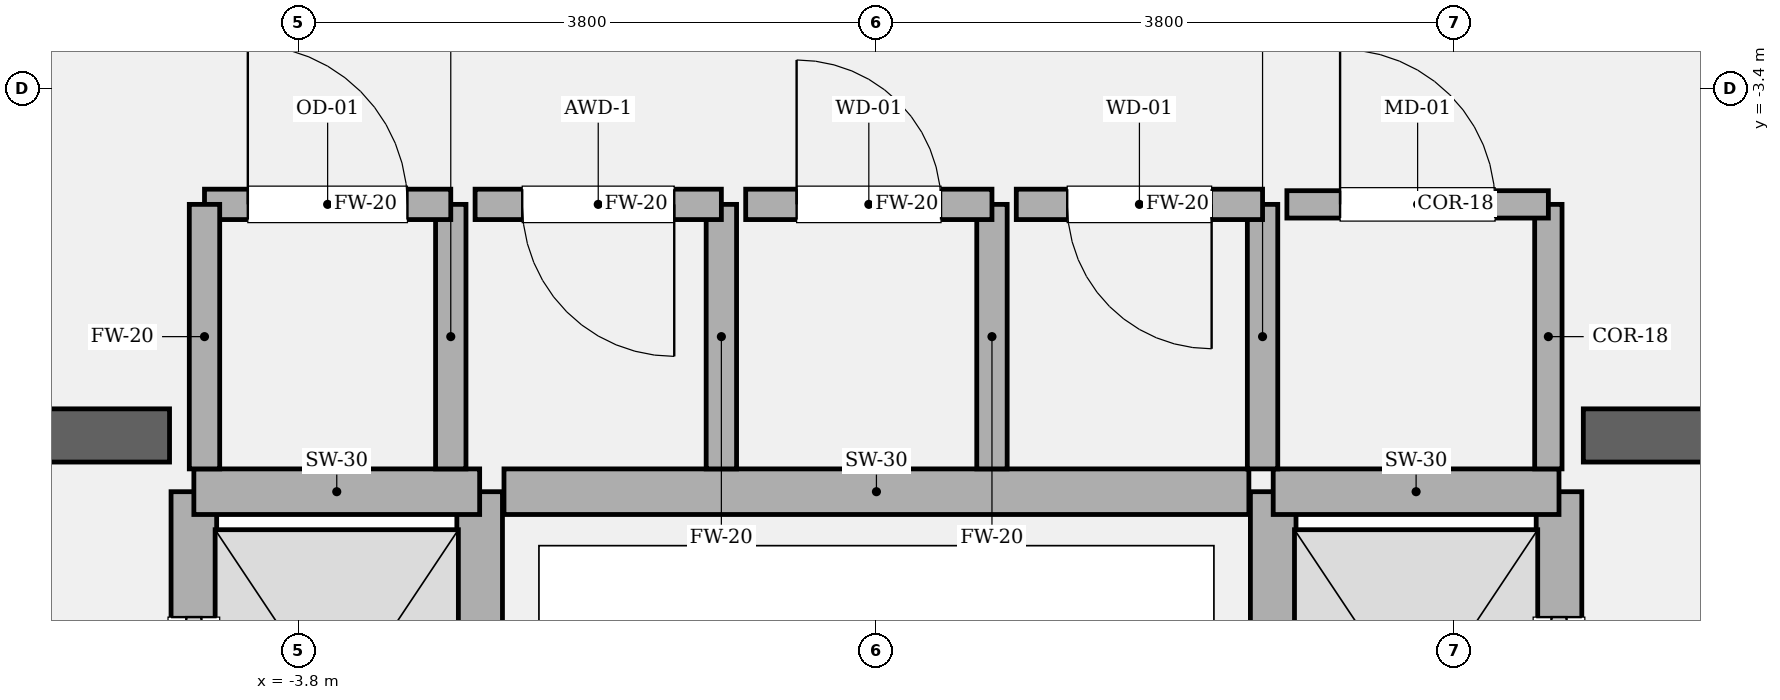
"""IFC4 building model, lengths in metres.
Left out: names, types, materials, properties, quantities, classifications, styles, units other than length and angle.
Written with IfcOpenShell. Run it as: python <this file> out.ifc"""

import sys

from ifc_helpers import new_model, si_unit, direction, frame, frame_2d, origin, place, context, subcontext, project, spatial, rectangle, extrude, element, fill, save


model = new_model("IFC4")
c1 = context("Model", 3, precision=1e-05, world=origin(), true_north=direction((0.0, 1.0)))
c2 = subcontext(c1, "Body", "Model", "MODEL_VIEW")
j1 = project(units=[si_unit("LENGTHUNIT", "METRE"), si_unit("PLANEANGLEUNIT", "RADIAN")], contexts=[c1])
p1 = place(None, origin())
s1 = spatial("IfcSite", under=j1, at=p1, CompositionType="ELEMENT")
p2 = place(p1, origin())
s2 = spatial("IfcBuilding", under=s1, at=p2, CompositionType="ELEMENT")
p3 = place(p2, frame((0.0, 0.0, 109.2)))
s3 = spatial("IfcBuildingStorey", under=s2, at=p3, CompositionType="ELEMENT", Elevation=109.2)
p4 = place(p3, frame((-9.825, -5.68, 0.0), z_axis=(0.0, 0.0, 1.0), x_axis=(1.0, 0.0, 0.0)))
e1 = element("IfcWall", 1, at=p4, inside=s3, PredefinedType="SOLIDWALL", context=c2, shape_type="SweptSolid", body=[
    extrude(rectangle(XDim=5.175, YDim=0.35, at=frame_2d((2.587, 0.0))), origin(), (0.0, 0.0, 1.0), 4.05),
])
p5 = place(p4, frame((1.285, 0.0, 0.0)))
e2 = element("IfcOpeningElement", 2, at=p5, cuts=e1, PredefinedType="OPENING", context=c2, shape_type="SweptSolid", body=[
    extrude(rectangle(XDim=1.18, YDim=2.2, at=frame_2d((0.59, 1.1))), frame((0.0, 0.185, 0.0), z_axis=(0.0, -1.0, 0.0), x_axis=(1.0, 0.0, 0.0)), (0.0, 0.0, 1.0), 0.37),
])
p6 = place(p3, frame((4.65, -5.68, 0.0), z_axis=(0.0, 0.0, 1.0), x_axis=(1.0, 0.0, 0.0)))
e3 = element("IfcWall", 3, at=p6, inside=s3, PredefinedType="SOLIDWALL", context=c2, shape_type="SweptSolid", body=[
    extrude(rectangle(XDim=5.175, YDim=0.35, at=frame_2d((2.587, 0.0))), origin(), (0.0, 0.0, 1.0), 4.05),
])
p7 = place(p6, frame((2.71, 0.0, 0.0)))
e4 = element("IfcOpeningElement", 4, at=p7, cuts=e3, PredefinedType="OPENING", context=c2, shape_type="SweptSolid", body=[
    extrude(rectangle(XDim=1.18, YDim=2.2, at=frame_2d((0.59, 1.1))), frame((0.0, 0.185, 0.0), z_axis=(0.0, -1.0, 0.0), x_axis=(1.0, 0.0, 0.0)), (0.0, 0.0, 1.0), 0.37),
])
p8 = place(p3, frame((-4.49, -8.82, 0.0), z_axis=(0.0, 0.0, 1.0), x_axis=(0.0, 1.0, 0.0)))
e5 = element("IfcWall", 5, at=p8, inside=s3, PredefinedType="SOLIDWALL", context=c2, shape_type="SweptSolid", body=[
    extrude(rectangle(XDim=2.77, YDim=0.3, at=frame_2d((1.385, 0.0))), origin(), (0.0, 0.0, 1.0), 3.81),
])
p9 = place(p8, frame((0.825, 0.0, 0.0)))
e6 = element("IfcOpeningElement", 6, at=p9, cuts=e5, PredefinedType="OPENING", context=c2, shape_type="SweptSolid", body=[
    extrude(rectangle(XDim=1.12, YDim=2.25, at=frame_2d((0.56, 1.125))), frame((0.0, 0.16, 0.0), z_axis=(0.0, -1.0, 0.0), x_axis=(1.0, 0.0, 0.0)), (0.0, 0.0, 1.0), 0.32),
])
p10 = place(p3, frame((-2.61, -8.82, 0.0), z_axis=(0.0, 0.0, 1.0), x_axis=(0.0, 1.0, 0.0)))
e7 = element("IfcWall", 7, at=p10, inside=s3, PredefinedType="SOLIDWALL", context=c2, shape_type="SweptSolid", body=[
    extrude(rectangle(XDim=2.77, YDim=0.3, at=frame_2d((1.385, 0.0))), origin(), (0.0, 0.0, 1.0), 3.81),
])
p11 = place(p3, frame((-4.49, -6.05, 0.0), z_axis=(0.0, 0.0, 1.0), x_axis=(1.0, 0.0, 0.0)))
e8 = element("IfcWall", 8, at=p11, inside=s3, PredefinedType="SOLIDWALL", context=c2, shape_type="SweptSolid", body=[
    extrude(rectangle(XDim=1.88, YDim=0.3, at=frame_2d((0.94, 0.0))), origin(), (0.0, 0.0, 1.0), 3.81),
])
p12 = place(p3, frame((4.49, -8.82, 0.0), z_axis=(0.0, 0.0, 1.0), x_axis=(0.0, 1.0, 0.0)))
e9 = element("IfcWall", 9, at=p12, inside=s3, PredefinedType="SOLIDWALL", context=c2, shape_type="SweptSolid", body=[
    extrude(rectangle(XDim=2.77, YDim=0.3, at=frame_2d((1.385, 0.0))), origin(), (0.0, 0.0, 1.0), 3.81),
])
p13 = place(p12, frame((0.825, 0.0, 0.0)))
e10 = element("IfcOpeningElement", 10, at=p13, cuts=e9, PredefinedType="OPENING", context=c2, shape_type="SweptSolid", body=[
    extrude(rectangle(XDim=1.12, YDim=2.25, at=frame_2d((0.56, 1.125))), frame((0.0, 0.16, 0.0), z_axis=(0.0, -1.0, 0.0), x_axis=(1.0, 0.0, 0.0)), (0.0, 0.0, 1.0), 0.32),
])
p14 = place(p3, frame((2.61, -8.82, 0.0), z_axis=(0.0, 0.0, 1.0), x_axis=(0.0, 1.0, 0.0)))
e11 = element("IfcWall", 11, at=p14, inside=s3, PredefinedType="SOLIDWALL", context=c2, shape_type="SweptSolid", body=[
    extrude(rectangle(XDim=2.77, YDim=0.3, at=frame_2d((1.385, 0.0))), origin(), (0.0, 0.0, 1.0), 3.81),
])
p15 = place(p3, frame((2.61, -6.05, 0.0), z_axis=(0.0, 0.0, 1.0), x_axis=(1.0, 0.0, 0.0)))
e12 = element("IfcWall", 12, at=p15, inside=s3, PredefinedType="SOLIDWALL", context=c2, shape_type="SweptSolid", body=[
    extrude(rectangle(XDim=1.88, YDim=0.3, at=frame_2d((0.94, 0.0))), origin(), (0.0, 0.0, 1.0), 3.81),
])
p16 = place(p3, frame((-2.45, -6.05, 0.0), z_axis=(0.0, 0.0, 1.0), x_axis=(1.0, 0.0, 0.0)))
e13 = element("IfcWall", 13, at=p16, inside=s3, PredefinedType="SOLIDWALL", context=c2, shape_type="SweptSolid", body=[
    extrude(rectangle(XDim=4.9, YDim=0.3, at=frame_2d((2.45, 0.0))), origin(), (0.0, 0.0, 1.0), 3.81),
])
p17 = place(p3, frame((-2.8, -5.9, 0.0), z_axis=(0.0, 0.0, 1.0), x_axis=(0.0, 1.0, 0.0)))
e14 = element("IfcWall", 14, at=p17, inside=s3, PredefinedType="SOLIDWALL", context=c2, shape_type="SweptSolid", body=[
    extrude(rectangle(XDim=1.74, YDim=0.2, at=frame_2d((0.87, 0.0))), origin(), (0.0, 0.0, 1.0), 3.81),
])
p18 = place(p3, frame((-2.8, -4.16, 0.0), z_axis=(0.0, 0.0, 1.0), x_axis=(-1.0, 0.0, 0.0)))
e15 = element("IfcWall", 15, at=p18, inside=s3, PredefinedType="SOLIDWALL", context=c2, shape_type="SweptSolid", body=[
    extrude(rectangle(XDim=1.62, YDim=0.2, at=frame_2d((0.81, 0.0))), origin(), (0.0, 0.0, 1.0), 3.81),
])
p19 = place(p18, frame((0.285, 0.0, 0.0)))
e16 = element("IfcOpeningElement", 16, at=p19, cuts=e15, PredefinedType="OPENING", context=c2, shape_type="SweptSolid", body=[
    extrude(rectangle(XDim=1.05, YDim=2.2, at=frame_2d((0.525, 1.1))), frame((0.0, 0.11, 0.0), z_axis=(0.0, -1.0, 0.0), x_axis=(1.0, 0.0, 0.0)), (0.0, 0.0, 1.0), 0.22),
])
for number, where, z_axis, x_axis in (
    (17, (-4.42, -4.16, 0.0), (0.0, 0.0, 1.0), (0.0, -1.0, 0.0)),
    (18, (-1.02, -5.9, 0.0), (0.0, 0.0, 1.0), (0.0, 1.0, 0.0)),
):
    element("IfcWall", number, at=place(p3, frame(where, z_axis=z_axis, x_axis=x_axis)), inside=s3, PredefinedType="SOLIDWALL", context=c2, shape_type="SweptSolid", body=[
        extrude(rectangle(XDim=1.74, YDim=0.2, at=frame_2d((0.87, 0.0))), origin(), (0.0, 0.0, 1.0), 3.81),
    ])
p20 = place(p3, frame((-1.02, -4.16, 0.0), z_axis=(0.0, 0.0, 1.0), x_axis=(-1.0, 0.0, 0.0)))
e19 = element("IfcWall", 19, at=p20, inside=s3, PredefinedType="SOLIDWALL", context=c2, shape_type="SweptSolid", body=[
    extrude(rectangle(XDim=1.62, YDim=0.2, at=frame_2d((0.81, 0.0))), origin(), (0.0, 0.0, 1.0), 3.81),
])
p21 = place(p20, frame((0.31, 0.0, 0.0)))
e20 = element("IfcOpeningElement", 20, at=p21, cuts=e19, PredefinedType="OPENING", context=c2, shape_type="SweptSolid", body=[
    extrude(rectangle(XDim=1.0, YDim=2.15, at=frame_2d((0.5, 1.075))), frame((0.0, 0.11, 0.0), z_axis=(0.0, -1.0, 0.0), x_axis=(1.0, 0.0, 0.0)), (0.0, 0.0, 1.0), 0.22),
])
p22 = place(p3, frame((0.76, -5.9, 0.0), z_axis=(0.0, 0.0, 1.0), x_axis=(0.0, 1.0, 0.0)))
e21 = element("IfcWall", 21, at=p22, inside=s3, PredefinedType="SOLIDWALL", context=c2, shape_type="SweptSolid", body=[
    extrude(rectangle(XDim=1.74, YDim=0.2, at=frame_2d((0.87, 0.0))), origin(), (0.0, 0.0, 1.0), 3.81),
])
p23 = place(p3, frame((0.76, -4.16, 0.0), z_axis=(0.0, 0.0, 1.0), x_axis=(-1.0, 0.0, 0.0)))
e22 = element("IfcWall", 22, at=p23, inside=s3, PredefinedType="SOLIDWALL", context=c2, shape_type="SweptSolid", body=[
    extrude(rectangle(XDim=1.62, YDim=0.2, at=frame_2d((0.81, 0.0))), origin(), (0.0, 0.0, 1.0), 3.81),
])
p24 = place(p23, frame((0.335, 0.0, 0.0)))
e23 = element("IfcOpeningElement", 23, at=p24, cuts=e22, PredefinedType="OPENING", context=c2, shape_type="SweptSolid", body=[
    extrude(rectangle(XDim=0.95, YDim=2.15, at=frame_2d((0.475, 1.075))), frame((0.0, 0.11, 0.0), z_axis=(0.0, -1.0, 0.0), x_axis=(1.0, 0.0, 0.0)), (0.0, 0.0, 1.0), 0.22),
])
p25 = place(p3, frame((2.54, -5.9, 0.0), z_axis=(0.0, 0.0, 1.0), x_axis=(0.0, 1.0, 0.0)))
e24 = element("IfcWall", 24, at=p25, inside=s3, PredefinedType="SOLIDWALL", context=c2, shape_type="SweptSolid", body=[
    extrude(rectangle(XDim=1.74, YDim=0.2, at=frame_2d((0.87, 0.0))), origin(), (0.0, 0.0, 1.0), 3.81),
])
p26 = place(p3, frame((2.54, -4.16, 0.0), z_axis=(0.0, 0.0, 1.0), x_axis=(-1.0, 0.0, 0.0)))
e25 = element("IfcWall", 25, at=p26, inside=s3, PredefinedType="SOLIDWALL", context=c2, shape_type="SweptSolid", body=[
    extrude(rectangle(XDim=1.62, YDim=0.2, at=frame_2d((0.81, 0.0))), origin(), (0.0, 0.0, 1.0), 3.81),
])
p27 = place(p26, frame((0.335, 0.0, 0.0)))
e26 = element("IfcOpeningElement", 26, at=p27, cuts=e25, PredefinedType="OPENING", context=c2, shape_type="SweptSolid", body=[
    extrude(rectangle(XDim=0.95, YDim=2.15, at=frame_2d((0.475, 1.075))), frame((0.0, 0.11, 0.0), z_axis=(0.0, -1.0, 0.0), x_axis=(1.0, 0.0, 0.0)), (0.0, 0.0, 1.0), 0.22),
])
p28 = place(p3, frame((4.42, -5.9, 0.0), z_axis=(0.0, 0.0, 1.0), x_axis=(0.0, 1.0, 0.0)))
e27 = element("IfcWall", 27, at=p28, inside=s3, PredefinedType="PARTITIONING", context=c2, shape_type="SweptSolid", body=[
    extrude(rectangle(XDim=1.74, YDim=0.18, at=frame_2d((0.87, 0.0))), origin(), (0.0, 0.0, 1.0), 3.81),
])
p29 = place(p3, frame((4.42, -4.16, 0.0), z_axis=(0.0, 0.0, 1.0), x_axis=(-1.0, 0.0, 0.0)))
e28 = element("IfcWall", 28, at=p29, inside=s3, PredefinedType="PARTITIONING", context=c2, shape_type="SweptSolid", body=[
    extrude(rectangle(XDim=1.72, YDim=0.18, at=frame_2d((0.86, 0.0))), origin(), (0.0, 0.0, 1.0), 3.81),
])
p30 = place(p29, frame((0.35, 0.0, 0.0)))
e29 = element("IfcOpeningElement", 29, at=p30, cuts=e28, PredefinedType="OPENING", context=c2, shape_type="SweptSolid", body=[
    extrude(rectangle(XDim=1.02, YDim=2.2, at=frame_2d((0.51, 1.1))), frame((0.0, 0.1, 0.0), z_axis=(0.0, -1.0, 0.0), x_axis=(1.0, 0.0, 0.0)), (0.0, 0.0, 1.0), 0.2),
])
p31 = place(p9, origin())
e30 = element("IfcDoor", 30, at=p31, inside=s3, OperationType="SLIDING_TO_LEFT", PredefinedType="DOOR", context=c2, shape_type="SweptSolid", body=[
    extrude(rectangle(XDim=1.12, YDim=2.25, at=frame_2d((0.56, 1.125))), frame((0.0, 0.025, 0.0), z_axis=(0.0, -1.0, 0.0), x_axis=(1.0, 0.0, 0.0)), (0.0, 0.0, 1.0), 0.05),
])
fill(e6, e30)
p32 = place(p13, origin())
e31 = element("IfcDoor", 31, at=p32, inside=s3, OperationType="SLIDING_TO_RIGHT", PredefinedType="DOOR", context=c2, shape_type="SweptSolid", body=[
    extrude(rectangle(XDim=1.12, YDim=2.25, at=frame_2d((0.56, 1.125))), frame((0.0, 0.025, 0.0), z_axis=(0.0, -1.0, 0.0), x_axis=(1.0, 0.0, 0.0)), (0.0, 0.0, 1.0), 0.05),
])
fill(e10, e31)
p33 = place(p19, origin())
e32 = element("IfcDoor", 32, at=p33, inside=s3, OperationType="SINGLE_SWING_RIGHT", PredefinedType="DOOR", context=c2, shape_type="SweptSolid", body=[
    extrude(rectangle(XDim=1.05, YDim=2.2, at=frame_2d((0.525, 1.1))), frame((0.0, 0.025, 0.0), z_axis=(0.0, -1.0, 0.0), x_axis=(1.0, 0.0, 0.0)), (0.0, 0.0, 1.0), 0.05),
])
fill(e16, e32)
p34 = place(p21, origin())
e33 = element("IfcDoor", 33, at=p34, inside=s3, OperationType="SINGLE_SWING_LEFT", PredefinedType="DOOR", context=c2, shape_type="SweptSolid", body=[
    extrude(rectangle(XDim=1.0, YDim=2.15, at=frame_2d((0.5, 1.075))), frame((0.0, 0.025, 0.0), z_axis=(0.0, -1.0, 0.0), x_axis=(1.0, 0.0, 0.0)), (0.0, 0.0, 1.0), 0.05),
])
fill(e20, e33)
p35 = place(p24, origin())
e34 = element("IfcDoor", 34, at=p35, inside=s3, OperationType="SINGLE_SWING_RIGHT", PredefinedType="DOOR", context=c2, shape_type="SweptSolid", body=[
    extrude(rectangle(XDim=0.95, YDim=2.15, at=frame_2d((0.475, 1.075))), frame((0.0, 0.025, 0.0), z_axis=(0.0, -1.0, 0.0), x_axis=(1.0, 0.0, 0.0)), (0.0, 0.0, 1.0), 0.05),
])
fill(e23, e34)
p36 = place(p27, origin())
e35 = element("IfcDoor", 35, at=p36, inside=s3, OperationType="SINGLE_SWING_LEFT", PredefinedType="DOOR", context=c2, shape_type="SweptSolid", body=[
    extrude(rectangle(XDim=0.95, YDim=2.15, at=frame_2d((0.475, 1.075))), frame((0.0, 0.025, 0.0), z_axis=(0.0, -1.0, 0.0), x_axis=(1.0, 0.0, 0.0)), (0.0, 0.0, 1.0), 0.05),
])
fill(e26, e35)
p37 = place(p30, origin())
e36 = element("IfcDoor", 36, at=p37, inside=s3, OperationType="SINGLE_SWING_RIGHT", PredefinedType="DOOR", context=c2, shape_type="SweptSolid", body=[
    extrude(rectangle(XDim=1.02, YDim=2.2, at=frame_2d((0.51, 1.1))), frame((0.0, 0.025, 0.0), z_axis=(0.0, -1.0, 0.0), x_axis=(1.0, 0.0, 0.0)), (0.0, 0.0, 1.0), 0.05),
])
fill(e29, e36)
save(model, sys.argv[1])
